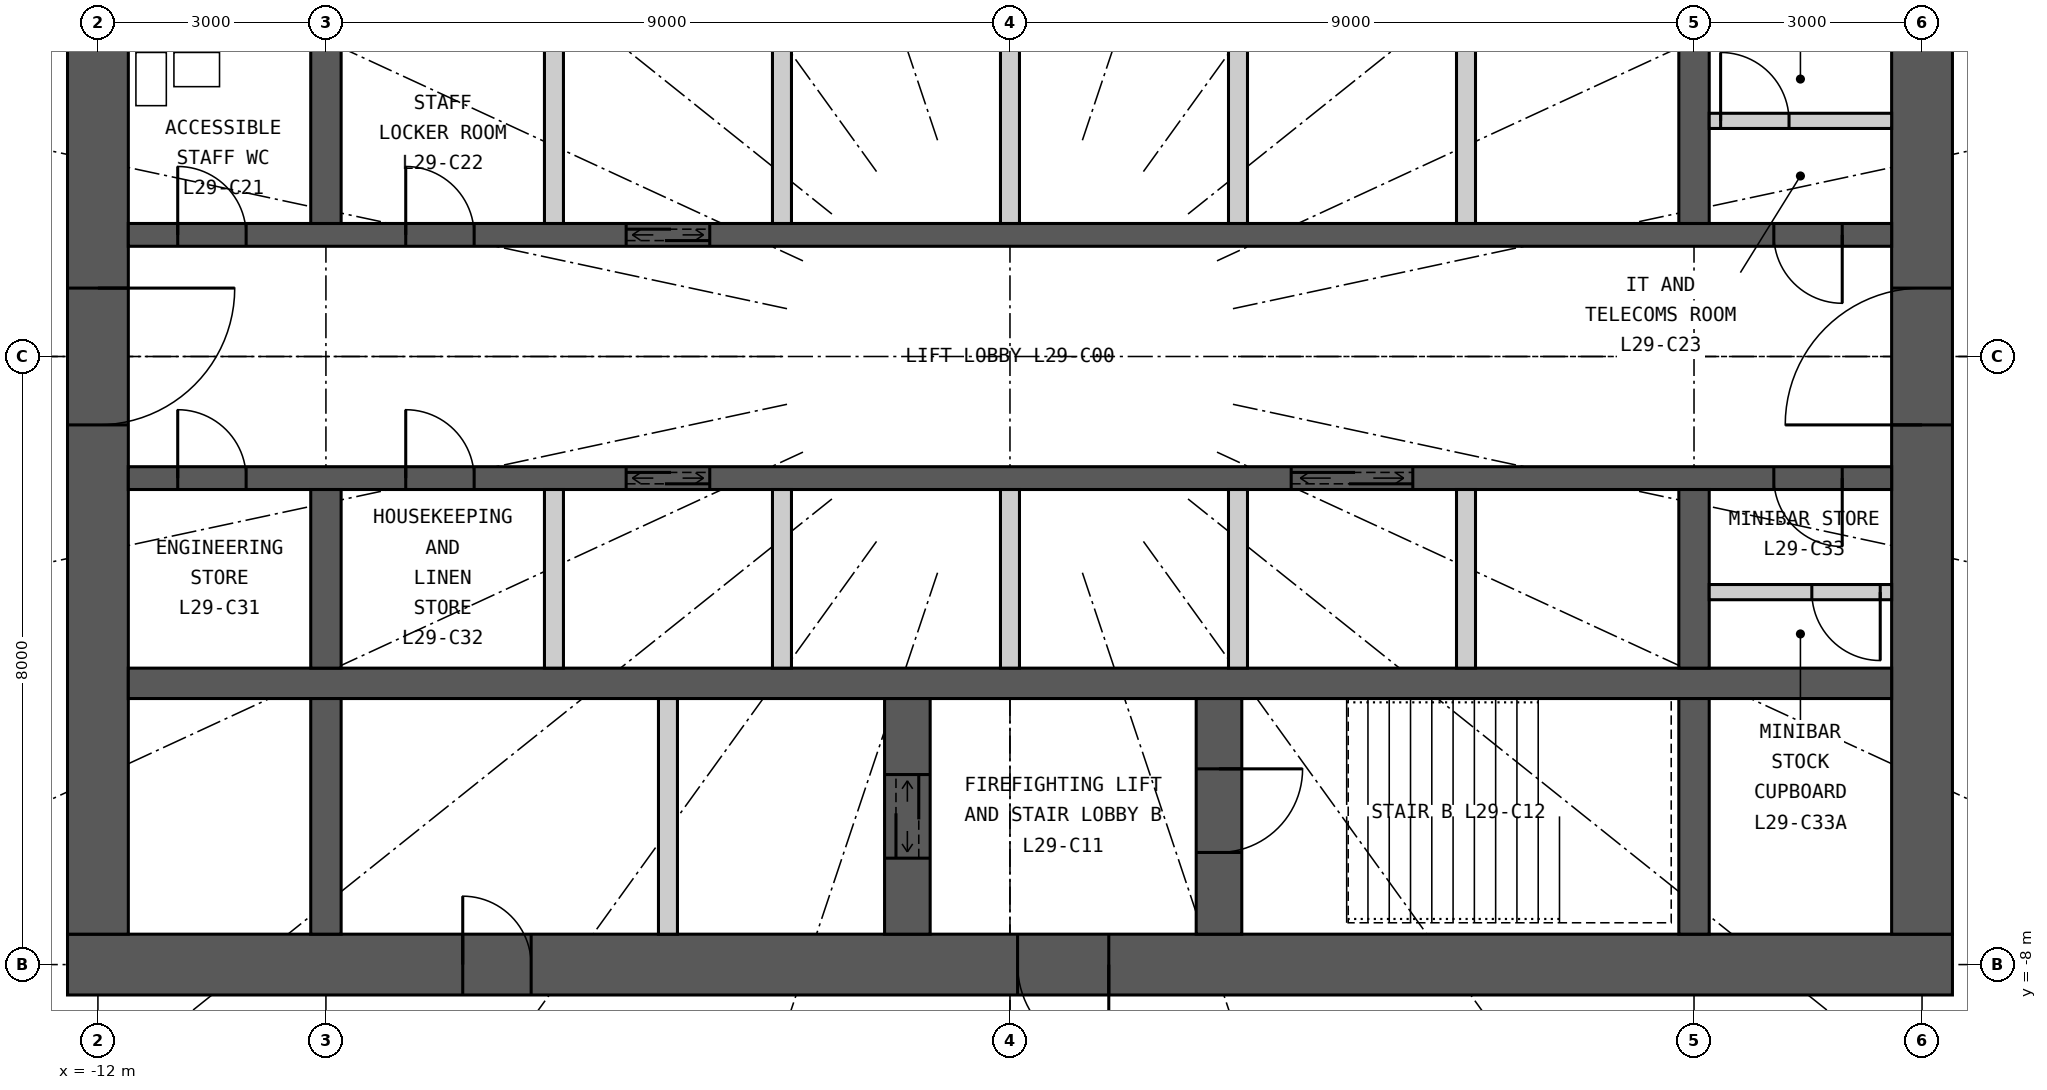
"""IFC4 building model, lengths in metres.
Left out: names, types, materials, properties, quantities, classifications, styles, units other than length and angle.
Written with IfcOpenShell. Run it as: python <this file> out.ifc"""

import sys

from ifc_helpers import new_model, si_unit, direction, frame, frame_2d, origin, place, context, subcontext, project, spatial, rectangle, extrude, element, fill, save


model = new_model("IFC4")
c1 = context("Model", 3, precision=1e-05, world=origin(), true_north=direction((0.0, 1.0)))
c2 = subcontext(c1, "Body", "Model", "MODEL_VIEW")
j1 = project(units=[si_unit("LENGTHUNIT", "METRE"), si_unit("PLANEANGLEUNIT", "RADIAN")], contexts=[c1])
p1 = place(None, origin())
s1 = spatial("IfcSite", under=j1, at=p1, CompositionType="ELEMENT")
p2 = place(p1, origin())
s2 = spatial("IfcBuilding", under=s1, at=p2, CompositionType="ELEMENT")
p3 = place(p2, frame((0.0, 0.0, 115.5)))
s3 = spatial("IfcBuildingStorey", under=s2, at=p3, CompositionType="ELEMENT", Elevation=115.5)
p4 = place(p3, frame((12.4, -8.0, 0.0), z_axis=(0.0, 0.0, 1.0), x_axis=(-1.0, 0.0, 0.0)))
e1 = element("IfcWall", 1, at=p4, inside=s3, PredefinedType="SHEAR", context=c2, shape_type="SweptSolid", body=[
    extrude(rectangle(XDim=24.8, YDim=0.8, at=frame_2d((12.4, 0.0))), origin(), (0.0, 0.0, 1.0), 3.3),
])
p5 = place(p4, frame((11.1, 0.0, 0.0)))
e2 = element("IfcOpeningElement", 2, at=p5, cuts=e1, PredefinedType="OPENING", context=c2, shape_type="SweptSolid", body=[
    extrude(rectangle(XDim=1.2, YDim=2.2, at=frame_2d((0.6, 1.1))), frame((0.0, 0.41, 0.0), z_axis=(0.0, -1.0, 0.0), x_axis=(1.0, 0.0, 0.0)), (0.0, 0.0, 1.0), 0.82),
])
p6 = place(p4, frame((18.7, 0.0, 0.0)))
e3 = element("IfcOpeningElement", 3, at=p6, cuts=e1, PredefinedType="OPENING", context=c2, shape_type="SweptSolid", body=[
    extrude(rectangle(XDim=0.9, YDim=2.2, at=frame_2d((0.45, 1.1))), frame((0.0, 0.41, 0.0), z_axis=(0.0, -1.0, 0.0), x_axis=(1.0, 0.0, 0.0)), (0.0, 0.0, 1.0), 0.82),
])
p7 = place(p3, frame((12.0, -7.6, 0.0), z_axis=(0.0, 0.0, 1.0), x_axis=(0.0, 1.0, 0.0)))
e4 = element("IfcWall", 4, at=p7, inside=s3, PredefinedType="SHEAR", context=c2, shape_type="SweptSolid", body=[
    extrude(rectangle(XDim=15.2, YDim=0.8, at=frame_2d((7.6, 0.0))), origin(), (0.0, 0.0, 1.0), 3.3),
])
p8 = place(p7, frame((6.7, 0.0, 0.0)))
e5 = element("IfcOpeningElement", 5, at=p8, cuts=e4, PredefinedType="OPENING", context=c2, shape_type="SweptSolid", body=[
    extrude(rectangle(XDim=1.8, YDim=2.2, at=frame_2d((0.9, 1.1))), frame((0.0, 0.41, 0.0), z_axis=(0.0, -1.0, 0.0), x_axis=(1.0, 0.0, 0.0)), (0.0, 0.0, 1.0), 0.82),
])
p9 = place(p3, frame((-12.0, 7.6, 0.0), z_axis=(0.0, 0.0, 1.0), x_axis=(0.0, -1.0, 0.0)))
e6 = element("IfcWall", 6, at=p9, inside=s3, PredefinedType="SHEAR", context=c2, shape_type="SweptSolid", body=[
    extrude(rectangle(XDim=15.2, YDim=0.8, at=frame_2d((7.6, 0.0))), origin(), (0.0, 0.0, 1.0), 3.3),
])
p10 = place(p9, frame((6.7, 0.0, 0.0)))
e7 = element("IfcOpeningElement", 7, at=p10, cuts=e6, PredefinedType="OPENING", context=c2, shape_type="SweptSolid", body=[
    extrude(rectangle(XDim=1.8, YDim=2.2, at=frame_2d((0.9, 1.1))), frame((0.0, 0.41, 0.0), z_axis=(0.0, -1.0, 0.0), x_axis=(1.0, 0.0, 0.0)), (0.0, 0.0, 1.0), 0.82),
])
p11 = place(p3, frame((-11.6, 1.6, 0.0), z_axis=(0.0, 0.0, 1.0), x_axis=(1.0, 0.0, 0.0)))
e8 = element("IfcWall", 8, at=p11, inside=s3, PredefinedType="SHEAR", context=c2, shape_type="SweptSolid", body=[
    extrude(rectangle(XDim=23.2, YDim=0.3, at=frame_2d((11.6, 0.0))), origin(), (0.0, 0.0, 1.0), 3.3),
])
p12 = place(p11, frame((6.55, 0.0, 0.0)))
e9 = element("IfcOpeningElement", 9, at=p12, cuts=e8, PredefinedType="OPENING", context=c2, shape_type="SweptSolid", body=[
    extrude(rectangle(XDim=1.1, YDim=2.2, at=frame_2d((0.55, 1.1))), frame((0.0, 0.16, 0.0), z_axis=(0.0, -1.0, 0.0), x_axis=(1.0, 0.0, 0.0)), (0.0, 0.0, 1.0), 0.32),
])
p13 = place(p11, frame((0.65, 0.0, 0.0)))
e10 = element("IfcOpeningElement", 10, at=p13, cuts=e8, PredefinedType="OPENING", context=c2, shape_type="SweptSolid", body=[
    extrude(rectangle(XDim=0.9, YDim=2.2, at=frame_2d((0.45, 1.1))), frame((0.0, 0.16, 0.0), z_axis=(0.0, -1.0, 0.0), x_axis=(1.0, 0.0, 0.0)), (0.0, 0.0, 1.0), 0.32),
])
p14 = place(p11, frame((3.65, 0.0, 0.0)))
e11 = element("IfcOpeningElement", 11, at=p14, cuts=e8, PredefinedType="OPENING", context=c2, shape_type="SweptSolid", body=[
    extrude(rectangle(XDim=0.9, YDim=2.2, at=frame_2d((0.45, 1.1))), frame((0.0, 0.16, 0.0), z_axis=(0.0, -1.0, 0.0), x_axis=(1.0, 0.0, 0.0)), (0.0, 0.0, 1.0), 0.32),
])
p15 = place(p11, frame((21.65, 0.0, 0.0)))
e12 = element("IfcOpeningElement", 12, at=p15, cuts=e8, PredefinedType="OPENING", context=c2, shape_type="SweptSolid", body=[
    extrude(rectangle(XDim=0.9, YDim=2.2, at=frame_2d((0.45, 1.1))), frame((0.0, 0.16, 0.0), z_axis=(0.0, -1.0, 0.0), x_axis=(1.0, 0.0, 0.0)), (0.0, 0.0, 1.0), 0.32),
])
p16 = place(p3, frame((-11.6, -4.3, 0.0), z_axis=(0.0, 0.0, 1.0), x_axis=(1.0, 0.0, 0.0)))
e13 = element("IfcWall", 13, at=p16, inside=s3, PredefinedType="SHEAR", context=c2, shape_type="SweptSolid", body=[
    extrude(rectangle(XDim=23.2, YDim=0.4, at=frame_2d((11.6, 0.0))), origin(), (0.0, 0.0, 1.0), 3.3),
])
p17 = place(p3, frame((-11.6, -1.6, 0.0), z_axis=(0.0, 0.0, 1.0), x_axis=(1.0, 0.0, 0.0)))
e14 = element("IfcWall", 14, at=p17, inside=s3, PredefinedType="SHEAR", context=c2, shape_type="SweptSolid", body=[
    extrude(rectangle(XDim=23.2, YDim=0.3, at=frame_2d((11.6, 0.0))), origin(), (0.0, 0.0, 1.0), 3.3),
])
p18 = place(p17, frame((6.55, 0.0, 0.0)))
e15 = element("IfcOpeningElement", 15, at=p18, cuts=e14, PredefinedType="OPENING", context=c2, shape_type="SweptSolid", body=[
    extrude(rectangle(XDim=1.1, YDim=2.2, at=frame_2d((0.55, 1.1))), frame((0.0, 0.16, 0.0), z_axis=(0.0, -1.0, 0.0), x_axis=(1.0, 0.0, 0.0)), (0.0, 0.0, 1.0), 0.32),
])
p19 = place(p17, frame((15.3, 0.0, 0.0)))
e16 = element("IfcOpeningElement", 16, at=p19, cuts=e14, PredefinedType="OPENING", context=c2, shape_type="SweptSolid", body=[
    extrude(rectangle(XDim=1.6, YDim=2.4, at=frame_2d((0.8, 1.2))), frame((0.0, 0.16, 0.0), z_axis=(0.0, -1.0, 0.0), x_axis=(1.0, 0.0, 0.0)), (0.0, 0.0, 1.0), 0.32),
])
p20 = place(p17, frame((0.65, 0.0, 0.0)))
e17 = element("IfcOpeningElement", 17, at=p20, cuts=e14, PredefinedType="OPENING", context=c2, shape_type="SweptSolid", body=[
    extrude(rectangle(XDim=0.9, YDim=2.2, at=frame_2d((0.45, 1.1))), frame((0.0, 0.16, 0.0), z_axis=(0.0, -1.0, 0.0), x_axis=(1.0, 0.0, 0.0)), (0.0, 0.0, 1.0), 0.32),
])
p21 = place(p17, frame((3.65, 0.0, 0.0)))
e18 = element("IfcOpeningElement", 18, at=p21, cuts=e14, PredefinedType="OPENING", context=c2, shape_type="SweptSolid", body=[
    extrude(rectangle(XDim=0.9, YDim=2.2, at=frame_2d((0.45, 1.1))), frame((0.0, 0.16, 0.0), z_axis=(0.0, -1.0, 0.0), x_axis=(1.0, 0.0, 0.0)), (0.0, 0.0, 1.0), 0.32),
])
p22 = place(p17, frame((21.65, 0.0, 0.0)))
e19 = element("IfcOpeningElement", 19, at=p22, cuts=e14, PredefinedType="OPENING", context=c2, shape_type="SweptSolid", body=[
    extrude(rectangle(XDim=0.9, YDim=2.2, at=frame_2d((0.45, 1.1))), frame((0.0, 0.16, 0.0), z_axis=(0.0, -1.0, 0.0), x_axis=(1.0, 0.0, 0.0)), (0.0, 0.0, 1.0), 0.32),
])
for number, where, z_axis, x_axis in (
    (20, (-9.0, 1.75, 0.0), (0.0, 0.0, 1.0), (0.0, 1.0, 0.0)),
    (21, (-9.0, -4.1, 0.0), (0.0, 0.0, 1.0), (0.0, 1.0, 0.0)),
):
    element("IfcWall", number, at=place(p3, frame(where, z_axis=z_axis, x_axis=x_axis)), inside=s3, PredefinedType="SHEAR", context=c2, shape_type="SweptSolid", body=[
        extrude(rectangle(XDim=2.35, YDim=0.4, at=frame_2d((1.175, 0.0))), origin(), (0.0, 0.0, 1.0), 3.3),
    ])
p23 = place(p3, frame((-9.0, -7.6, 0.0), z_axis=(0.0, 0.0, 1.0), x_axis=(0.0, 1.0, 0.0)))
e22 = element("IfcWall", 22, at=p23, inside=s3, PredefinedType="SHEAR", context=c2, shape_type="SweptSolid", body=[
    extrude(rectangle(XDim=3.1, YDim=0.4, at=frame_2d((1.55, 0.0))), origin(), (0.0, 0.0, 1.0), 3.3),
])
for number, where, z_axis, x_axis in (
    (23, (9.0, 1.75, 0.0), (0.0, 0.0, 1.0), (0.0, 1.0, 0.0)),
    (24, (9.0, -4.1, 0.0), (0.0, 0.0, 1.0), (0.0, 1.0, 0.0)),
):
    element("IfcWall", number, at=place(p3, frame(where, z_axis=z_axis, x_axis=x_axis)), inside=s3, PredefinedType="SHEAR", context=c2, shape_type="SweptSolid", body=[
        extrude(rectangle(XDim=2.35, YDim=0.4, at=frame_2d((1.175, 0.0))), origin(), (0.0, 0.0, 1.0), 3.3),
    ])
p24 = place(p3, frame((9.0, -7.6, 0.0), z_axis=(0.0, 0.0, 1.0), x_axis=(0.0, 1.0, 0.0)))
e25 = element("IfcWall", 25, at=p24, inside=s3, PredefinedType="SHEAR", context=c2, shape_type="SweptSolid", body=[
    extrude(rectangle(XDim=3.1, YDim=0.4, at=frame_2d((1.55, 0.0))), origin(), (0.0, 0.0, 1.0), 3.3),
])
p25 = place(p3, frame((2.75, -7.6, 0.0), z_axis=(0.0, 0.0, 1.0), x_axis=(0.0, 1.0, 0.0)))
e26 = element("IfcWall", 26, at=p25, inside=s3, PredefinedType="SHEAR", context=c2, shape_type="SweptSolid", body=[
    extrude(rectangle(XDim=3.1, YDim=0.6, at=frame_2d((1.55, 0.0))), origin(), (0.0, 0.0, 1.0), 3.3),
])
p26 = place(p25, frame((1.075, 0.0, 0.0)))
e27 = element("IfcOpeningElement", 27, at=p26, cuts=e26, PredefinedType="OPENING", context=c2, shape_type="SweptSolid", body=[
    extrude(rectangle(XDim=1.1, YDim=2.2, at=frame_2d((0.55, 1.1))), frame((0.0, 0.31, 0.0), z_axis=(0.0, -1.0, 0.0), x_axis=(1.0, 0.0, 0.0)), (0.0, 0.0, 1.0), 0.62),
])
p27 = place(p3, frame((-1.35, -7.6, 0.0), z_axis=(0.0, 0.0, 1.0), x_axis=(0.0, 1.0, 0.0)))
e28 = element("IfcWall", 28, at=p27, inside=s3, PredefinedType="SHEAR", context=c2, shape_type="SweptSolid", body=[
    extrude(rectangle(XDim=3.1, YDim=0.6, at=frame_2d((1.55, 0.0))), origin(), (0.0, 0.0, 1.0), 3.3),
])
p28 = place(p27, frame((1.0, 0.0, 0.0)))
e29 = element("IfcOpeningElement", 29, at=p28, cuts=e28, PredefinedType="OPENING", context=c2, shape_type="SweptSolid", body=[
    extrude(rectangle(XDim=1.1, YDim=2.2, at=frame_2d((0.55, 1.1))), frame((0.0, 0.31, 0.0), z_axis=(0.0, -1.0, 0.0), x_axis=(1.0, 0.0, 0.0)), (0.0, 0.0, 1.0), 0.62),
])
p29 = place(p3, frame((-4.5, -7.6, 0.0), z_axis=(0.0, 0.0, 1.0), x_axis=(0.0, 1.0, 0.0)))
e30 = element("IfcWall", 30, at=p29, inside=s3, PredefinedType="PARTITIONING", context=c2, shape_type="SweptSolid", body=[
    extrude(rectangle(XDim=3.1, YDim=0.25, at=frame_2d((1.55, 0.0))), origin(), (0.0, 0.0, 1.0), 3.3),
])
for number, where, z_axis, x_axis in (
    (31, (-6.0, 1.75, 0.0), (0.0, 0.0, 1.0), (0.0, 1.0, 0.0)),
    (32, (-3.0, 1.75, 0.0), (0.0, 0.0, 1.0), (0.0, 1.0, 0.0)),
    (33, (0.0, 1.75, 0.0), (0.0, 0.0, 1.0), (0.0, 1.0, 0.0)),
    (34, (3.0, 1.75, 0.0), (0.0, 0.0, 1.0), (0.0, 1.0, 0.0)),
    (35, (6.0, 1.75, 0.0), (0.0, 0.0, 1.0), (0.0, 1.0, 0.0)),
    (36, (-6.0, -4.1, 0.0), (0.0, 0.0, 1.0), (0.0, 1.0, 0.0)),
    (37, (-3.0, -4.1, 0.0), (0.0, 0.0, 1.0), (0.0, 1.0, 0.0)),
    (38, (0.0, -4.1, 0.0), (0.0, 0.0, 1.0), (0.0, 1.0, 0.0)),
    (39, (3.0, -4.1, 0.0), (0.0, 0.0, 1.0), (0.0, 1.0, 0.0)),
    (40, (6.0, -4.1, 0.0), (0.0, 0.0, 1.0), (0.0, 1.0, 0.0)),
):
    element("IfcWall", number, at=place(p3, frame(where, z_axis=z_axis, x_axis=x_axis)), inside=s3, PredefinedType="PARTITIONING", context=c2, shape_type="SweptSolid", body=[
        extrude(rectangle(XDim=2.35, YDim=0.25, at=frame_2d((1.175, 0.0))), origin(), (0.0, 0.0, 1.0), 3.3),
    ])
p30 = place(p3, frame((9.2, 3.1, 0.0), z_axis=(0.0, 0.0, 1.0), x_axis=(1.0, 0.0, 0.0)))
e41 = element("IfcWall", 41, at=p30, inside=s3, PredefinedType="PARTITIONING", context=c2, shape_type="SweptSolid", body=[
    extrude(rectangle(XDim=2.4, YDim=0.2, at=frame_2d((1.2, 0.0))), origin(), (0.0, 0.0, 1.0), 3.12),
])
p31 = place(p30, frame((0.15, 0.0, 0.0)))
e42 = element("IfcOpeningElement", 42, at=p31, cuts=e41, PredefinedType="OPENING", context=c2, shape_type="SweptSolid", body=[
    extrude(rectangle(XDim=0.9, YDim=2.2, at=frame_2d((0.45, 1.1))), frame((0.0, 0.11, 0.0), z_axis=(0.0, -1.0, 0.0), x_axis=(1.0, 0.0, 0.0)), (0.0, 0.0, 1.0), 0.22),
])
p32 = place(p3, frame((9.2, -3.1, 0.0), z_axis=(0.0, 0.0, 1.0), x_axis=(1.0, 0.0, 0.0)))
e43 = element("IfcWall", 43, at=p32, inside=s3, PredefinedType="PARTITIONING", context=c2, shape_type="SweptSolid", body=[
    extrude(rectangle(XDim=2.4, YDim=0.2, at=frame_2d((1.2, 0.0))), origin(), (0.0, 0.0, 1.0), 3.12),
])
p33 = place(p32, frame((1.35, 0.0, 0.0)))
e44 = element("IfcOpeningElement", 44, at=p33, cuts=e43, PredefinedType="OPENING", context=c2, shape_type="SweptSolid", body=[
    extrude(rectangle(XDim=0.9, YDim=2.2, at=frame_2d((0.45, 1.1))), frame((0.0, 0.11, 0.0), z_axis=(0.0, -1.0, 0.0), x_axis=(1.0, 0.0, 0.0)), (0.0, 0.0, 1.0), 0.22),
])
p34 = place(p5, origin())
e45 = element("IfcDoor", 45, at=p34, inside=s3, OperationType="SINGLE_SWING_LEFT", PredefinedType="DOOR", context=c2, shape_type="SweptSolid", body=[
    extrude(rectangle(XDim=1.2, YDim=2.2, at=frame_2d((0.6, 1.1))), frame((0.0, 0.025, 0.0), z_axis=(0.0, -1.0, 0.0), x_axis=(1.0, 0.0, 0.0)), (0.0, 0.0, 1.0), 0.05),
])
fill(e2, e45)
p35 = place(p26, origin())
e46 = element("IfcDoor", 46, at=p35, inside=s3, OperationType="SINGLE_SWING_RIGHT", PredefinedType="DOOR", context=c2, shape_type="SweptSolid", body=[
    extrude(rectangle(XDim=1.1, YDim=2.2, at=frame_2d((0.55, 1.1))), frame((0.0, 0.025, 0.0), z_axis=(0.0, -1.0, 0.0), x_axis=(1.0, 0.0, 0.0)), (0.0, 0.0, 1.0), 0.05),
])
fill(e27, e46)
p36 = place(p28, origin())
e47 = element("IfcDoor", 47, at=p36, inside=s3, OperationType="DOUBLE_DOOR_SLIDING", PredefinedType="DOOR", context=c2, shape_type="SweptSolid", body=[
    extrude(rectangle(XDim=1.1, YDim=2.2, at=frame_2d((0.55, 1.1))), frame((0.0, 0.025, 0.0), z_axis=(0.0, -1.0, 0.0), x_axis=(1.0, 0.0, 0.0)), (0.0, 0.0, 1.0), 0.05),
])
fill(e29, e47)
p37 = place(p6, origin())
e48 = element("IfcDoor", 48, at=p37, inside=s3, OperationType="SINGLE_SWING_RIGHT", PredefinedType="DOOR", context=c2, shape_type="SweptSolid", body=[
    extrude(rectangle(XDim=0.9, YDim=2.2, at=frame_2d((0.45, 1.1))), frame((0.0, 0.025, 0.0), z_axis=(0.0, -1.0, 0.0), x_axis=(1.0, 0.0, 0.0)), (0.0, 0.0, 1.0), 0.05),
])
fill(e3, e48)
p38 = place(p12, origin())
e49 = element("IfcDoor", 49, at=p38, inside=s3, OperationType="DOUBLE_DOOR_SLIDING", PredefinedType="DOOR", context=c2, shape_type="SweptSolid", body=[
    extrude(rectangle(XDim=1.1, YDim=2.2, at=frame_2d((0.55, 1.1))), frame((0.0, 0.025, 0.0), z_axis=(0.0, -1.0, 0.0), x_axis=(1.0, 0.0, 0.0)), (0.0, 0.0, 1.0), 0.05),
])
fill(e9, e49)
p39 = place(p18, origin())
e50 = element("IfcDoor", 50, at=p39, inside=s3, OperationType="DOUBLE_DOOR_SLIDING", PredefinedType="DOOR", context=c2, shape_type="SweptSolid", body=[
    extrude(rectangle(XDim=1.1, YDim=2.2, at=frame_2d((0.55, 1.1))), frame((0.0, 0.025, 0.0), z_axis=(0.0, -1.0, 0.0), x_axis=(1.0, 0.0, 0.0)), (0.0, 0.0, 1.0), 0.05),
])
fill(e15, e50)
p40 = place(p19, origin())
e51 = element("IfcDoor", 51, at=p40, inside=s3, OperationType="DOUBLE_DOOR_SLIDING", PredefinedType="DOOR", context=c2, shape_type="SweptSolid", body=[
    extrude(rectangle(XDim=1.6, YDim=2.4, at=frame_2d((0.8, 1.2))), frame((0.0, 0.025, 0.0), z_axis=(0.0, -1.0, 0.0), x_axis=(1.0, 0.0, 0.0)), (0.0, 0.0, 1.0), 0.05),
])
fill(e16, e51)
p41 = place(p13, origin())
e52 = element("IfcDoor", 52, at=p41, inside=s3, OperationType="SINGLE_SWING_LEFT", PredefinedType="DOOR", context=c2, shape_type="SweptSolid", body=[
    extrude(rectangle(XDim=0.9, YDim=2.2, at=frame_2d((0.45, 1.1))), frame((0.0, 0.025, 0.0), z_axis=(0.0, -1.0, 0.0), x_axis=(1.0, 0.0, 0.0)), (0.0, 0.0, 1.0), 0.05),
])
fill(e10, e52)
p42 = place(p14, origin())
e53 = element("IfcDoor", 53, at=p42, inside=s3, OperationType="SINGLE_SWING_LEFT", PredefinedType="DOOR", context=c2, shape_type="SweptSolid", body=[
    extrude(rectangle(XDim=0.9, YDim=2.2, at=frame_2d((0.45, 1.1))), frame((0.0, 0.025, 0.0), z_axis=(0.0, -1.0, 0.0), x_axis=(1.0, 0.0, 0.0)), (0.0, 0.0, 1.0), 0.05),
])
fill(e11, e53)
p43 = place(p31, origin())
e54 = element("IfcDoor", 54, at=p43, inside=s3, OperationType="SINGLE_SWING_LEFT", PredefinedType="DOOR", context=c2, shape_type="SweptSolid", body=[
    extrude(rectangle(XDim=0.9, YDim=2.2, at=frame_2d((0.45, 1.1))), frame((0.0, 0.025, 0.0), z_axis=(0.0, -1.0, 0.0), x_axis=(1.0, 0.0, 0.0)), (0.0, 0.0, 1.0), 0.05),
])
fill(e42, e54)
p44 = place(p15, origin())
e55 = element("IfcDoor", 55, at=p44, inside=s3, OperationType="SINGLE_SWING_RIGHT", PredefinedType="DOOR", context=c2, shape_type="SweptSolid", body=[
    extrude(rectangle(XDim=0.9, YDim=2.2, at=frame_2d((0.45, 1.1))), frame((0.0, 0.025, 0.0), z_axis=(0.0, -1.0, 0.0), x_axis=(1.0, 0.0, 0.0)), (0.0, 0.0, 1.0), 0.05),
])
fill(e12, e55)
p45 = place(p20, origin())
e56 = element("IfcDoor", 56, at=p45, inside=s3, OperationType="SINGLE_SWING_LEFT", PredefinedType="DOOR", context=c2, shape_type="SweptSolid", body=[
    extrude(rectangle(XDim=0.9, YDim=2.2, at=frame_2d((0.45, 1.1))), frame((0.0, 0.025, 0.0), z_axis=(0.0, -1.0, 0.0), x_axis=(1.0, 0.0, 0.0)), (0.0, 0.0, 1.0), 0.05),
])
fill(e17, e56)
p46 = place(p21, origin())
e57 = element("IfcDoor", 57, at=p46, inside=s3, OperationType="SINGLE_SWING_LEFT", PredefinedType="DOOR", context=c2, shape_type="SweptSolid", body=[
    extrude(rectangle(XDim=0.9, YDim=2.2, at=frame_2d((0.45, 1.1))), frame((0.0, 0.025, 0.0), z_axis=(0.0, -1.0, 0.0), x_axis=(1.0, 0.0, 0.0)), (0.0, 0.0, 1.0), 0.05),
])
fill(e18, e57)
p47 = place(p33, origin())
e58 = element("IfcDoor", 58, at=p47, inside=s3, OperationType="SINGLE_SWING_RIGHT", PredefinedType="DOOR", context=c2, shape_type="SweptSolid", body=[
    extrude(rectangle(XDim=0.9, YDim=2.2, at=frame_2d((0.45, 1.1))), frame((0.0, 0.025, 0.0), z_axis=(0.0, -1.0, 0.0), x_axis=(1.0, 0.0, 0.0)), (0.0, 0.0, 1.0), 0.05),
])
fill(e44, e58)
p48 = place(p22, origin())
e59 = element("IfcDoor", 59, at=p48, inside=s3, OperationType="SINGLE_SWING_RIGHT", PredefinedType="DOOR", context=c2, shape_type="SweptSolid", body=[
    extrude(rectangle(XDim=0.9, YDim=2.2, at=frame_2d((0.45, 1.1))), frame((0.0, 0.025, 0.0), z_axis=(0.0, -1.0, 0.0), x_axis=(1.0, 0.0, 0.0)), (0.0, 0.0, 1.0), 0.05),
])
fill(e19, e59)
p49 = place(p8, origin())
e60 = element("IfcDoor", 60, at=p49, inside=s3, OperationType="DOUBLE_DOOR_DOUBLE_SWING", PredefinedType="DOOR", context=c2, shape_type="SweptSolid", body=[
    extrude(rectangle(XDim=1.8, YDim=2.2, at=frame_2d((0.9, 1.1))), frame((0.0, 0.025, 0.0), z_axis=(0.0, -1.0, 0.0), x_axis=(1.0, 0.0, 0.0)), (0.0, 0.0, 1.0), 0.05),
])
fill(e5, e60)
p50 = place(p10, origin())
e61 = element("IfcDoor", 61, at=p50, inside=s3, OperationType="DOUBLE_DOOR_DOUBLE_SWING", PredefinedType="DOOR", context=c2, shape_type="SweptSolid", body=[
    extrude(rectangle(XDim=1.8, YDim=2.2, at=frame_2d((0.9, 1.1))), frame((0.0, 0.025, 0.0), z_axis=(0.0, -1.0, 0.0), x_axis=(1.0, 0.0, 0.0)), (0.0, 0.0, 1.0), 0.05),
])
fill(e7, e61)
save(model, sys.argv[1])
